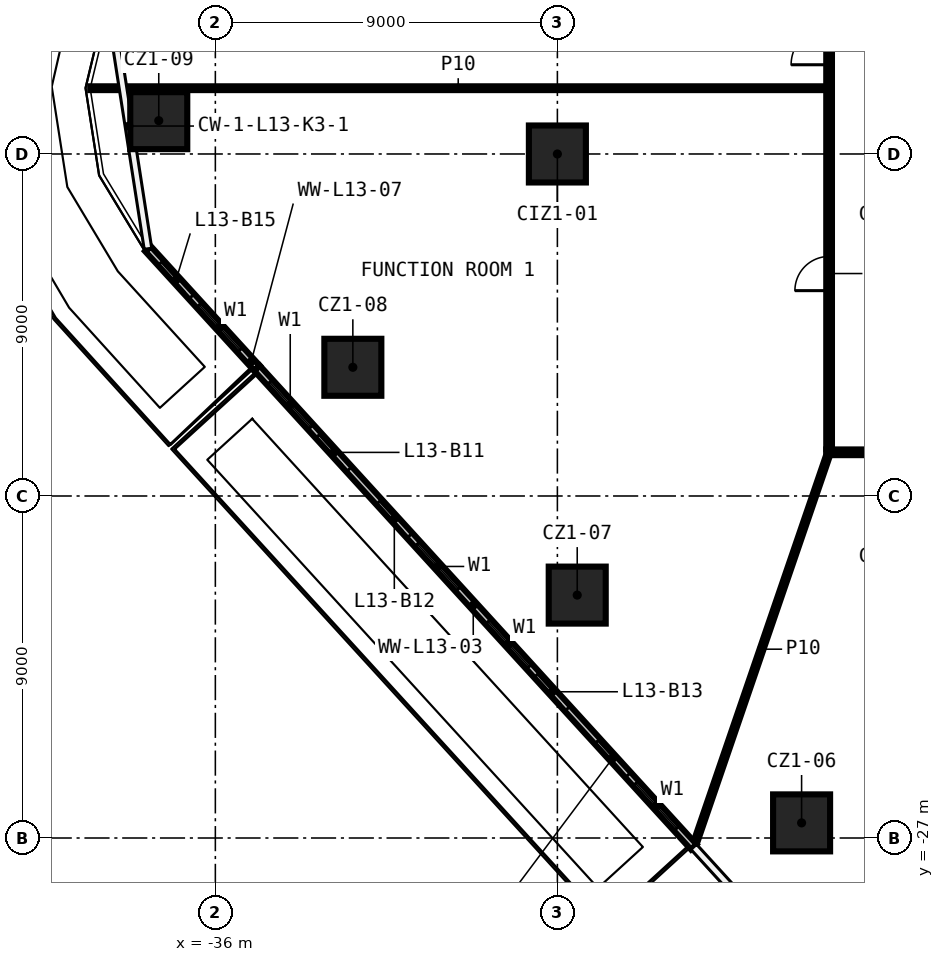
"""IFC4 building model, lengths in metres.
Left out: names, types, materials, properties, quantities, classifications, styles, units other than length and angle.
Written with IfcOpenShell. Run it as: python <this file> out.ifc"""

import sys

from ifc_helpers import new_model, si_unit, direction, frame, frame_2d, origin, origin_2d, place, context, subcontext, project, spatial, rectangle, extrude, element, fill, save


model = new_model("IFC4")
c1 = context("Model", 3, precision=1e-05, world=origin(), true_north=direction((0.0, 1.0)))
c2 = subcontext(c1, "Body", "Model", "MODEL_VIEW")
j1 = project(units=[si_unit("LENGTHUNIT", "METRE"), si_unit("PLANEANGLEUNIT", "RADIAN")], contexts=[c1])
p1 = place(None, origin())
s1 = spatial("IfcSite", under=j1, at=p1, CompositionType="ELEMENT")
p2 = place(p1, origin())
s2 = spatial("IfcBuilding", under=s1, at=p2, CompositionType="ELEMENT")
p3 = place(p2, frame((0.0, 0.0, 69.9)))
s3 = spatial("IfcBuildingStorey", under=s2, at=p3, CompositionType="ELEMENT", Elevation=69.9)
for number, where, z_axis, x_axis in (
    (1, (-20.574, -26.602, 0.0), (0.0, 0.0, 1.0), (1.0, 0.0, 0.0)),
    (2, (-26.478, -20.608, 0.0), (0.0, 0.0, 1.0), (1.0, 0.0, 0.0)),
    (3, (-32.382, -14.613, 0.0), (0.0, 0.0, 1.0), (1.0, 0.0, 0.0)),
    (4, (-37.489, -8.123, 0.0), (0.0, 0.0, 1.0), (1.0, 0.0, 0.0)),
    (5, (-27.0, -9.0, 0.0), (0.0, 0.0, 1.0), (1.0, 0.0, 0.0)),
):
    element("IfcColumn", number, at=place(p3, frame(where, z_axis=z_axis, x_axis=x_axis)), inside=s3, PredefinedType="COLUMN", context=c2, shape_type="SweptSolid", body=[
        extrude(rectangle(XDim=1.5, YDim=1.5, at=origin_2d()), origin(), (0.0, 0.0, 1.0), 3.3),
    ])
p4 = place(p3, frame((19.925, -16.85, 0.0), z_axis=(0.0, 0.0, 1.0), x_axis=(-1.0, 0.0, 0.0)))
e6 = element("IfcWall", 6, at=p4, inside=s3, PredefinedType="PARTITIONING", context=c2, shape_type="SweptSolid", body=[
    extrude(rectangle(XDim=39.85, YDim=0.15, at=frame_2d((19.925, 0.0))), origin(), (0.0, 0.0, 1.0), 3.3),
])
p5 = place(p4, frame((30.959, 0.0, 0.0)))
e7 = element("IfcOpeningElement", 7, at=p5, cuts=e6, PredefinedType="OPENING", context=c2, shape_type="SweptSolid", body=[
    extrude(rectangle(XDim=0.9, YDim=2.1, at=frame_2d((0.45, 1.05))), frame((0.0, 0.085, 0.0), z_axis=(0.0, -1.0, 0.0), x_axis=(1.0, 0.0, 0.0)), (0.0, 0.0, 1.0), 0.17),
])
p6 = place(p4, frame((22.077, 0.0, 0.0)))
e8 = element("IfcOpeningElement", 8, at=p6, cuts=e6, PredefinedType="OPENING", context=c2, shape_type="SweptSolid", body=[
    extrude(rectangle(XDim=0.9, YDim=2.1, at=frame_2d((0.45, 1.05))), frame((0.0, 0.085, 0.0), z_axis=(0.0, -1.0, 0.0), x_axis=(1.0, 0.0, 0.0)), (0.0, 0.0, 1.0), 0.17),
])
p7 = place(p3, frame((-39.293, -7.269, 0.0), z_axis=(0.0, 0.0, 1.0), x_axis=(1.0, 0.0, 0.0)))
e9 = element("IfcWall", 9, at=p7, inside=s3, PredefinedType="PARTITIONING", context=c2, shape_type="SweptSolid", body=[
    extrude(rectangle(XDim=19.368, YDim=0.1, at=frame_2d((9.684, 0.0))), origin(), (0.0, 0.0, 1.0), 3.3),
])
p8 = place(p3, frame((-23.404, -27.213, 0.0), z_axis=(0.0, 0.0, 1.0), x_axis=(0.32441263541, 0.945915663253, 0.0)))
e10 = element("IfcWall", 10, at=p8, inside=s3, PredefinedType="PARTITIONING", context=c2, shape_type="SweptSolid", body=[
    extrude(rectangle(XDim=10.955, YDim=0.1, at=frame_2d((5.478, 0.0))), origin(), (0.0, 0.0, 1.0), 3.3),
])
p9 = place(p3, frame((-19.85, -16.775, 0.0), z_axis=(0.0, 0.0, 1.0), x_axis=(0.0, 1.0, 0.0)))
e11 = element("IfcWall", 11, at=p9, inside=s3, PredefinedType="PARTITIONING", context=c2, shape_type="SweptSolid", body=[
    extrude(rectangle(XDim=33.55, YDim=0.15, at=frame_2d((16.775, 0.0))), origin(), (0.0, 0.0, 1.0), 3.3),
])
p10 = place(p9, frame((10.123, 0.0, 0.0)))
e12 = element("IfcOpeningElement", 12, at=p10, cuts=e11, PredefinedType="OPENING", context=c2, shape_type="SweptSolid", body=[
    extrude(rectangle(XDim=1.0, YDim=2.1, at=frame_2d((0.5, 1.05))), frame((0.0, 0.085, 0.0), z_axis=(0.0, -1.0, 0.0), x_axis=(1.0, 0.0, 0.0)), (0.0, 0.0, 1.0), 0.17),
])
p11 = place(p9, frame((4.179, 0.0, 0.0)))
e13 = element("IfcOpeningElement", 13, at=p11, cuts=e11, PredefinedType="OPENING", context=c2, shape_type="SweptSolid", body=[
    extrude(rectangle(XDim=0.9, YDim=2.1, at=frame_2d((0.45, 1.05))), frame((0.0, 0.085, 0.0), z_axis=(0.0, -1.0, 0.0), x_axis=(1.0, 0.0, 0.0)), (0.0, 0.0, 1.0), 0.17),
])
p12 = place(p9, frame((27.651, 0.0, 0.0)))
e14 = element("IfcOpeningElement", 14, at=p12, cuts=e11, PredefinedType="OPENING", context=c2, shape_type="SweptSolid", body=[
    extrude(rectangle(XDim=1.0, YDim=2.1, at=frame_2d((0.5, 1.05))), frame((0.0, 0.085, 0.0), z_axis=(0.0, -1.0, 0.0), x_axis=(1.0, 0.0, 0.0)), (0.0, 0.0, 1.0), 0.17),
])
p13 = place(p9, frame((20.601, 0.0, 0.0)))
e15 = element("IfcOpeningElement", 15, at=p13, cuts=e11, PredefinedType="OPENING", context=c2, shape_type="SweptSolid", body=[
    extrude(rectangle(XDim=1.0, YDim=2.1, at=frame_2d((0.5, 1.05))), frame((0.0, 0.085, 0.0), z_axis=(0.0, -1.0, 0.0), x_axis=(1.0, 0.0, 0.0)), (0.0, 0.0, 1.0), 0.17),
])
p14 = place(p3, frame((-34.906, -14.636, 0.0), z_axis=(0.0, 0.0, 1.0), x_axis=(0.674011334321, -0.738721003632, 0.0)))
e16 = element("IfcWall", 16, at=p14, inside=s3, PredefinedType="SOLIDWALL", context=c2, shape_type="SweptSolid", body=[
    extrude(rectangle(XDim=17.053, YDim=0.2, at=frame_2d((8.527, 0.0))), origin(), (0.0, 0.0, 1.0), 3.3),
])
p15 = place(p14, frame((0.5, 0.0, 0.6)))
e17 = element("IfcOpeningElement", 17, at=p15, cuts=e16, PredefinedType="OPENING", context=c2, shape_type="SweptSolid", body=[
    extrude(rectangle(XDim=1.6, YDim=2.4, at=frame_2d((0.8, 1.2))), frame((0.0, 0.11, 0.0), z_axis=(0.0, -1.0, 0.0), x_axis=(1.0, 0.0, 0.0)), (0.0, 0.0, 1.0), 0.22),
])
p16 = place(p14, frame((2.4, 0.0, 0.0)))
e18 = element("IfcOpeningElement", 18, at=p16, cuts=e16, PredefinedType="OPENING", context=c2, shape_type="SweptSolid", body=[
    extrude(rectangle(XDim=1.2, YDim=2.4, at=frame_2d((0.6, 1.2))), frame((0.0, 0.11, 0.0), z_axis=(0.0, -1.0, 0.0), x_axis=(1.0, 0.0, 0.0)), (0.0, 0.0, 1.0), 0.22),
])
p17 = place(p14, frame((6.263, 0.0, 0.6)))
e19 = element("IfcOpeningElement", 19, at=p17, cuts=e16, PredefinedType="OPENING", context=c2, shape_type="SweptSolid", body=[
    extrude(rectangle(XDim=1.6, YDim=2.4, at=frame_2d((0.8, 1.2))), frame((0.0, 0.11, 0.0), z_axis=(0.0, -1.0, 0.0), x_axis=(1.0, 0.0, 0.0)), (0.0, 0.0, 1.0), 0.22),
])
p18 = place(p14, frame((4.763, 0.0, 0.0)))
e20 = element("IfcOpeningElement", 20, at=p18, cuts=e16, PredefinedType="OPENING", context=c2, shape_type="SweptSolid", body=[
    extrude(rectangle(XDim=1.2, YDim=2.4, at=frame_2d((0.6, 1.2))), frame((0.0, 0.11, 0.0), z_axis=(0.0, -1.0, 0.0), x_axis=(1.0, 0.0, 0.0)), (0.0, 0.0, 1.0), 0.22),
])
p19 = place(p14, frame((9.027, 0.0, 0.6)))
e21 = element("IfcOpeningElement", 21, at=p19, cuts=e16, PredefinedType="OPENING", context=c2, shape_type="SweptSolid", body=[
    extrude(rectangle(XDim=1.6, YDim=2.4, at=frame_2d((0.8, 1.2))), frame((0.0, 0.11, 0.0), z_axis=(0.0, -1.0, 0.0), x_axis=(1.0, 0.0, 0.0)), (0.0, 0.0, 1.0), 0.22),
])
p20 = place(p14, frame((10.927, 0.0, 0.0)))
e22 = element("IfcOpeningElement", 22, at=p20, cuts=e16, PredefinedType="OPENING", context=c2, shape_type="SweptSolid", body=[
    extrude(rectangle(XDim=1.2, YDim=2.4, at=frame_2d((0.6, 1.2))), frame((0.0, 0.11, 0.0), z_axis=(0.0, -1.0, 0.0), x_axis=(1.0, 0.0, 0.0)), (0.0, 0.0, 1.0), 0.22),
])
p21 = place(p14, frame((14.79, 0.0, 0.6)))
e23 = element("IfcOpeningElement", 23, at=p21, cuts=e16, PredefinedType="OPENING", context=c2, shape_type="SweptSolid", body=[
    extrude(rectangle(XDim=1.6, YDim=2.4, at=frame_2d((0.8, 1.2))), frame((0.0, 0.11, 0.0), z_axis=(0.0, -1.0, 0.0), x_axis=(1.0, 0.0, 0.0)), (0.0, 0.0, 1.0), 0.22),
])
p22 = place(p14, frame((13.29, 0.0, 0.0)))
e24 = element("IfcOpeningElement", 24, at=p22, cuts=e16, PredefinedType="OPENING", context=c2, shape_type="SweptSolid", body=[
    extrude(rectangle(XDim=1.2, YDim=2.4, at=frame_2d((0.6, 1.2))), frame((0.0, 0.11, 0.0), z_axis=(0.0, -1.0, 0.0), x_axis=(1.0, 0.0, 0.0)), (0.0, 0.0, 1.0), 0.22),
])
p23 = place(p3, frame((-37.773, -11.494, 0.0), z_axis=(0.0, 0.0, 1.0), x_axis=(0.673994410995, -0.738736444172, 0.0)))
e25 = element("IfcWall", 25, at=p23, inside=s3, PredefinedType="SOLIDWALL", context=c2, shape_type="SweptSolid", body=[
    extrude(rectangle(XDim=4.254, YDim=0.2, at=frame_2d((2.127, 0.0))), origin(), (0.0, 0.0, 1.0), 3.3),
])
p24 = place(p23, frame((2.0, 0.0, 0.6)))
e26 = element("IfcOpeningElement", 26, at=p24, cuts=e25, PredefinedType="OPENING", context=c2, shape_type="SweptSolid", body=[
    extrude(rectangle(XDim=1.6, YDim=2.4, at=frame_2d((0.8, 1.2))), frame((0.0, 0.11, 0.0), z_axis=(0.0, -1.0, 0.0), x_axis=(1.0, 0.0, 0.0)), (0.0, 0.0, 1.0), 0.22),
])
p25 = place(p23, frame((0.5, 0.0, 0.0)))
e27 = element("IfcOpeningElement", 27, at=p25, cuts=e25, PredefinedType="OPENING", context=c2, shape_type="SweptSolid", body=[
    extrude(rectangle(XDim=1.2, YDim=2.4, at=frame_2d((0.6, 1.2))), frame((0.0, 0.11, 0.0), z_axis=(0.0, -1.0, 0.0), x_axis=(1.0, 0.0, 0.0)), (0.0, 0.0, 1.0), 0.22),
])
p26 = place(p10, origin())
e28 = element("IfcDoor", 28, at=p26, inside=s3, OperationType="SINGLE_SWING_RIGHT", PredefinedType="DOOR", context=c2, shape_type="SweptSolid", body=[
    extrude(rectangle(XDim=1.0, YDim=2.1, at=frame_2d((0.5, 1.05))), frame((0.0, 0.025, 0.0), z_axis=(0.0, -1.0, 0.0), x_axis=(1.0, 0.0, 0.0)), (0.0, 0.0, 1.0), 0.05),
])
fill(e12, e28)
p27 = place(p11, origin())
e29 = element("IfcDoor", 29, at=p27, inside=s3, OperationType="SINGLE_SWING_LEFT", PredefinedType="DOOR", context=c2, shape_type="SweptSolid", body=[
    extrude(rectangle(XDim=0.9, YDim=2.1, at=frame_2d((0.45, 1.05))), frame((0.0, 0.025, 0.0), z_axis=(0.0, -1.0, 0.0), x_axis=(1.0, 0.0, 0.0)), (0.0, 0.0, 1.0), 0.05),
])
fill(e13, e29)
p28 = place(p15, origin())
e30 = element("IfcWindow", 30, at=p28, inside=s3, PartitioningType="SINGLE_PANEL", PredefinedType="WINDOW", context=c2, shape_type="SweptSolid", body=[
    extrude(rectangle(XDim=1.6, YDim=2.4, at=frame_2d((0.8, 1.2))), frame((0.0, 0.03, 0.0), z_axis=(0.0, -1.0, 0.0), x_axis=(1.0, 0.0, 0.0)), (0.0, 0.0, 1.0), 0.06),
])
fill(e17, e30)
p29 = place(p16, origin())
e31 = element("IfcDoor", 31, at=p29, inside=s3, OperationType="SLIDING_TO_LEFT", PredefinedType="DOOR", context=c2, shape_type="SweptSolid", body=[
    extrude(rectangle(XDim=1.2, YDim=2.4, at=frame_2d((0.6, 1.2))), frame((0.0, 0.025, 0.0), z_axis=(0.0, -1.0, 0.0), x_axis=(1.0, 0.0, 0.0)), (0.0, 0.0, 1.0), 0.05),
])
fill(e18, e31)
p30 = place(p17, origin())
e32 = element("IfcWindow", 32, at=p30, inside=s3, PartitioningType="SINGLE_PANEL", PredefinedType="WINDOW", context=c2, shape_type="SweptSolid", body=[
    extrude(rectangle(XDim=1.6, YDim=2.4, at=frame_2d((0.8, 1.2))), frame((0.0, 0.03, 0.0), z_axis=(0.0, -1.0, 0.0), x_axis=(1.0, 0.0, 0.0)), (0.0, 0.0, 1.0), 0.06),
])
fill(e19, e32)
p31 = place(p18, origin())
e33 = element("IfcDoor", 33, at=p31, inside=s3, OperationType="SLIDING_TO_LEFT", PredefinedType="DOOR", context=c2, shape_type="SweptSolid", body=[
    extrude(rectangle(XDim=1.2, YDim=2.4, at=frame_2d((0.6, 1.2))), frame((0.0, 0.025, 0.0), z_axis=(0.0, -1.0, 0.0), x_axis=(1.0, 0.0, 0.0)), (0.0, 0.0, 1.0), 0.05),
])
fill(e20, e33)
p32 = place(p19, origin())
e34 = element("IfcWindow", 34, at=p32, inside=s3, PartitioningType="SINGLE_PANEL", PredefinedType="WINDOW", context=c2, shape_type="SweptSolid", body=[
    extrude(rectangle(XDim=1.6, YDim=2.4, at=frame_2d((0.8, 1.2))), frame((0.0, 0.03, 0.0), z_axis=(0.0, -1.0, 0.0), x_axis=(1.0, 0.0, 0.0)), (0.0, 0.0, 1.0), 0.06),
])
fill(e21, e34)
p33 = place(p20, origin())
e35 = element("IfcDoor", 35, at=p33, inside=s3, OperationType="SLIDING_TO_LEFT", PredefinedType="DOOR", context=c2, shape_type="SweptSolid", body=[
    extrude(rectangle(XDim=1.2, YDim=2.4, at=frame_2d((0.6, 1.2))), frame((0.0, 0.025, 0.0), z_axis=(0.0, -1.0, 0.0), x_axis=(1.0, 0.0, 0.0)), (0.0, 0.0, 1.0), 0.05),
])
fill(e22, e35)
p34 = place(p21, origin())
e36 = element("IfcWindow", 36, at=p34, inside=s3, PartitioningType="SINGLE_PANEL", PredefinedType="WINDOW", context=c2, shape_type="SweptSolid", body=[
    extrude(rectangle(XDim=1.6, YDim=2.4, at=frame_2d((0.8, 1.2))), frame((0.0, 0.03, 0.0), z_axis=(0.0, -1.0, 0.0), x_axis=(1.0, 0.0, 0.0)), (0.0, 0.0, 1.0), 0.06),
])
fill(e23, e36)
p35 = place(p22, origin())
e37 = element("IfcDoor", 37, at=p35, inside=s3, OperationType="SLIDING_TO_LEFT", PredefinedType="DOOR", context=c2, shape_type="SweptSolid", body=[
    extrude(rectangle(XDim=1.2, YDim=2.4, at=frame_2d((0.6, 1.2))), frame((0.0, 0.025, 0.0), z_axis=(0.0, -1.0, 0.0), x_axis=(1.0, 0.0, 0.0)), (0.0, 0.0, 1.0), 0.05),
])
fill(e24, e37)
p36 = place(p24, origin())
e38 = element("IfcWindow", 38, at=p36, inside=s3, PartitioningType="SINGLE_PANEL", PredefinedType="WINDOW", context=c2, shape_type="SweptSolid", body=[
    extrude(rectangle(XDim=1.6, YDim=2.4, at=frame_2d((0.8, 1.2))), frame((0.0, 0.03, 0.0), z_axis=(0.0, -1.0, 0.0), x_axis=(1.0, 0.0, 0.0)), (0.0, 0.0, 1.0), 0.06),
])
fill(e26, e38)
p37 = place(p25, origin())
e39 = element("IfcDoor", 39, at=p37, inside=s3, OperationType="SLIDING_TO_LEFT", PredefinedType="DOOR", context=c2, shape_type="SweptSolid", body=[
    extrude(rectangle(XDim=1.2, YDim=2.4, at=frame_2d((0.6, 1.2))), frame((0.0, 0.025, 0.0), z_axis=(0.0, -1.0, 0.0), x_axis=(1.0, 0.0, 0.0)), (0.0, 0.0, 1.0), 0.05),
])
fill(e27, e39)
save(model, sys.argv[1])
